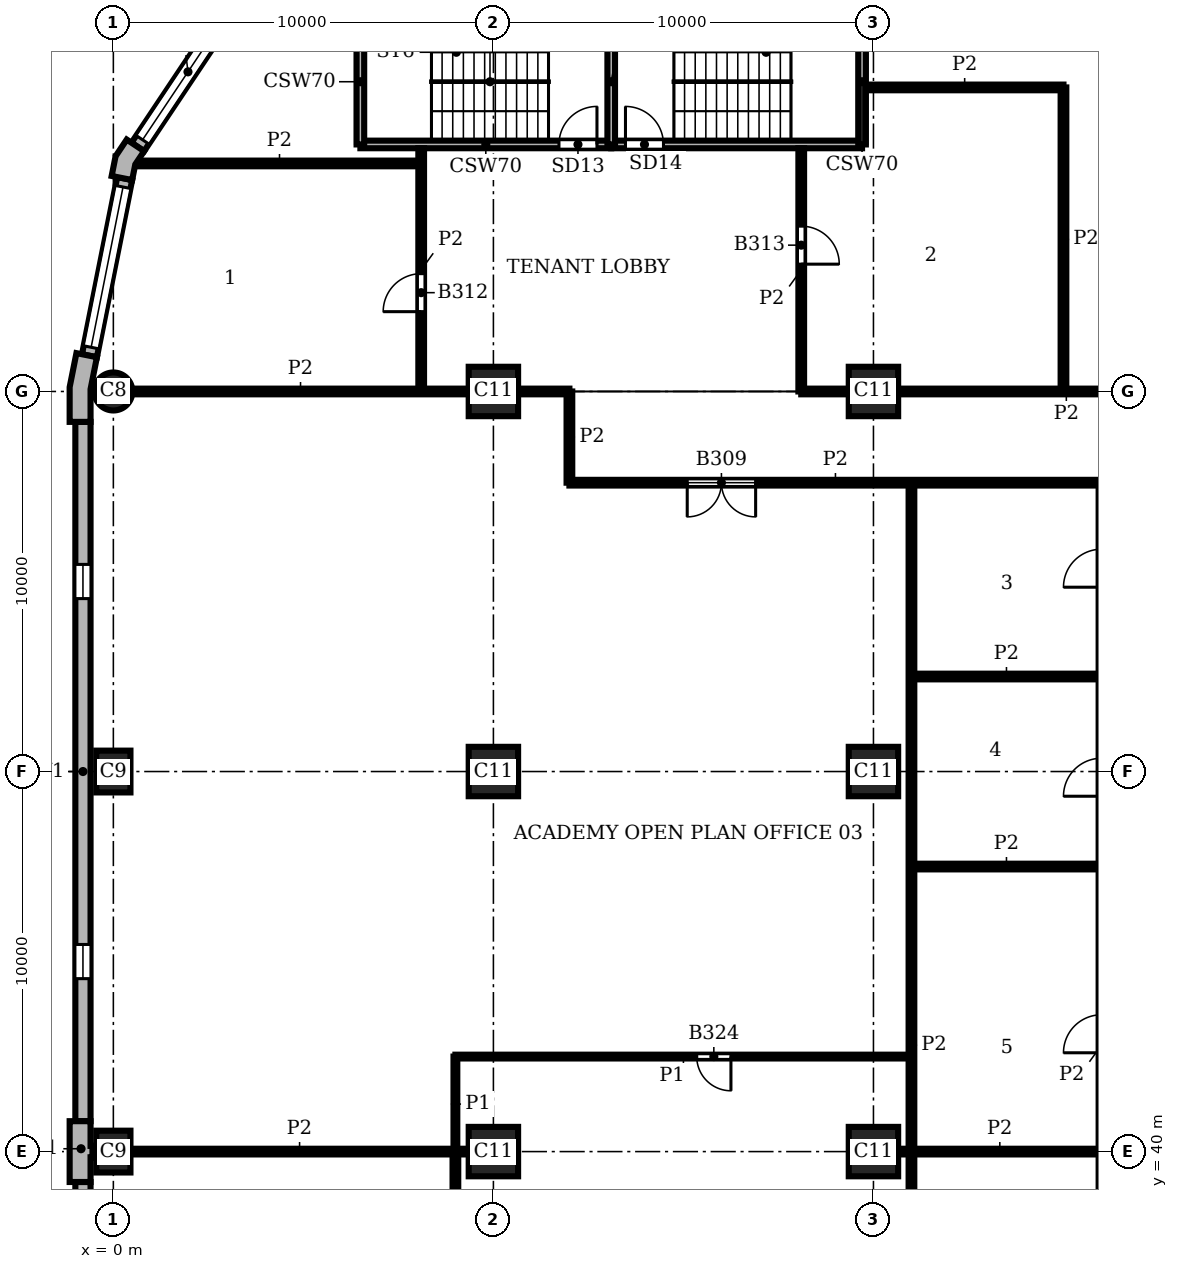
"""IFC4 building model, lengths in metres.
Left out: names, types, materials, properties, quantities, classifications, styles, units other than length and angle.
Written with IfcOpenShell. Run it as: python <this file> out.ifc"""

import sys

from ifc_helpers import new_model, si_unit, direction, frame, frame_2d, origin, origin_2d, place, context, subcontext, project, spatial, polyline, rectangle, circle, outline, extrude, element, fill, save


model = new_model("IFC4")
c1 = context("Model", 3, precision=1e-05, world=origin(), true_north=direction((0.0, 1.0)))
c2 = subcontext(c1, "Body", "Model", "MODEL_VIEW")
j1 = project(units=[si_unit("LENGTHUNIT", "METRE"), si_unit("PLANEANGLEUNIT", "RADIAN")], contexts=[c1])
p1 = place(None, origin())
s1 = spatial("IfcSite", under=j1, at=p1, CompositionType="ELEMENT")
p2 = place(p1, origin())
s2 = spatial("IfcBuilding", under=s1, at=p2, CompositionType="ELEMENT")
p3 = place(p2, frame((0.0, 0.0, 155.1)))
s3 = spatial("IfcBuildingStorey", under=s2, at=p3, CompositionType="ELEMENT", Elevation=155.1)
p4 = place(p3, frame((0.0, 60.0, 0.0), z_axis=(0.0, 0.0, 1.0), x_axis=(1.0, 0.0, 0.0)))
e1 = element("IfcColumn", 1, at=p4, inside=s3, PredefinedType="COLUMN", context=c2, shape_type="SweptSolid", body=[
    extrude(circle(Radius=0.5, at=origin_2d()), origin(), (0.0, 0.0, 1.0), 3.9),
])
for number, where, z_axis, x_axis in (
    (2, (0.0, 50.0, 0.0), (0.0, 0.0, 1.0), (0.0, 1.0, 0.0)),
    (3, (0.0, 40.0, 0.0), (0.0, 0.0, 1.0), (0.0, 1.0, 0.0)),
):
    element("IfcColumn", number, at=place(p3, frame(where, z_axis=z_axis, x_axis=x_axis)), inside=s3, PredefinedType="COLUMN", context=c2, shape_type="SweptSolid", body=[
        extrude(rectangle(XDim=1.1, YDim=0.9, at=origin_2d()), origin(), (0.0, 0.0, 1.0), 3.9),
    ])
for number, where, z_axis, x_axis in (
    (4, (10.0, 40.0, 0.0), (0.0, 0.0, 1.0), (1.0, 0.0, 0.0)),
    (5, (10.0, 50.0, 0.0), (0.0, 0.0, 1.0), (1.0, 0.0, 0.0)),
    (6, (10.0, 60.0, 0.0), (0.0, 0.0, 1.0), (1.0, 0.0, 0.0)),
    (7, (20.0, 40.0, 0.0), (0.0, 0.0, 1.0), (1.0, 0.0, 0.0)),
    (8, (20.0, 50.0, 0.0), (0.0, 0.0, 1.0), (1.0, 0.0, 0.0)),
    (9, (20.0, 60.0, 0.0), (0.0, 0.0, 1.0), (1.0, 0.0, 0.0)),
):
    element("IfcColumn", number, at=place(p3, frame(where, z_axis=z_axis, x_axis=x_axis)), inside=s3, PredefinedType="COLUMN", context=c2, shape_type="SweptSolid", body=[
        extrude(rectangle(XDim=1.3, YDim=1.3, at=origin_2d()), origin(), (0.0, 0.0, 1.0), 3.9),
    ])
p5 = place(p3, origin())
e10 = element("IfcWall", 10, at=p5, inside=s3, PredefinedType="SOLIDWALL", context=c2, shape_type="SweptSolid", body=[
    extrude(outline(polyline([(0.477, 66.545), (0.352, 66.629), (0.059, 66.189), (-0.045, 65.67), (0.103, 65.641), (0.495, 65.563), (0.577, 65.974), (0.81, 66.323), (0.477, 66.545)])), origin(), (0.0, 0.0, 1.0), 3.9),
])
e11 = element("IfcWall", 11, at=p5, inside=s3, PredefinedType="SOLIDWALL", context=c2, shape_type="SweptSolid", body=[
    extrude(outline(polyline([(-0.825, 60.98), (-0.972, 61.009), (-1.15, 60.113), (-1.15, 59.2), (-1.0, 59.2), (-0.6, 59.2), (-0.6, 60.059), (-0.432, 60.902), (-0.825, 60.98)])), origin(), (0.0, 0.0, 1.0), 3.9),
])
e12 = element("IfcWall", 12, at=p5, inside=s3, PredefinedType="SOLIDWALL", context=c2, shape_type="SweptSolid", body=[
    extrude(outline(polyline([(-0.6, 39.2), (-0.6, 39.85), (-0.55, 39.85), (-0.55, 40.15), (-0.6, 40.15), (-0.6, 40.8), (-1.0, 40.8), (-1.15, 40.8), (-1.15, 40.0), (-1.15, 39.2), (-1.0, 39.2), (-0.6, 39.2)])), origin(), (0.0, 0.0, 1.0), 3.9),
])
p6 = place(p3, frame((3.284, 70.386, 0.0), z_axis=(0.0, 0.0, 1.0), x_axis=(-0.555541552266, -0.831488775454, 0.0)))
e13 = element("IfcWall", 13, at=p6, inside=s3, PredefinedType="SOLIDWALL", context=c2, shape_type="SweptSolid", body=[
    extrude(rectangle(XDim=4.753, YDim=0.4, at=frame_2d((2.376, 0.0))), origin(), (0.0, 0.0, 1.0), 3.9),
])
p7 = place(p6, frame((0.226, 0.0, 0.9)))
e14 = element("IfcOpeningElement", 14, at=p7, cuts=e13, PredefinedType="OPENING", context=c2, shape_type="SweptSolid", body=[
    extrude(rectangle(XDim=4.3, YDim=2.35, at=frame_2d((2.15, 1.175))), frame((0.0, 0.21, 0.0), z_axis=(0.0, -1.0, 0.0), x_axis=(1.0, 0.0, 0.0)), (0.0, 0.0, 1.0), 0.42),
])
p8 = place(p3, frame((0.299, 65.602, 0.0), z_axis=(0.0, 0.0, 1.0), x_axis=(-0.195098533057, -0.98078364709, 0.0)))
e15 = element("IfcWall", 15, at=p8, inside=s3, PredefinedType="SOLIDWALL", context=c2, shape_type="SweptSolid", body=[
    extrude(rectangle(XDim=4.753, YDim=0.4, at=frame_2d((2.376, 0.0))), origin(), (0.0, 0.0, 1.0), 3.9),
])
p9 = place(p8, frame((0.226, 0.0, 0.9)))
e16 = element("IfcOpeningElement", 16, at=p9, cuts=e15, PredefinedType="OPENING", context=c2, shape_type="SweptSolid", body=[
    extrude(rectangle(XDim=4.3, YDim=2.35, at=frame_2d((2.15, 1.175))), frame((0.0, 0.21, 0.0), z_axis=(0.0, -1.0, 0.0), x_axis=(1.0, 0.0, 0.0)), (0.0, 0.0, 1.0), 0.42),
])
p10 = place(p3, frame((-0.8, 59.2, 0.0), z_axis=(0.0, 0.0, 1.0), x_axis=(0.0, -1.0, 0.0)))
e17 = element("IfcWall", 17, at=p10, inside=s3, PredefinedType="SOLIDWALL", context=c2, shape_type="SweptSolid", body=[
    extrude(rectangle(XDim=18.4, YDim=0.4, at=frame_2d((9.2, 0.0))), origin(), (0.0, 0.0, 1.0), 3.9),
])
p11 = place(p10, frame((3.75, 0.0, 0.9)))
e18 = element("IfcOpeningElement", 18, at=p11, cuts=e17, PredefinedType="OPENING", context=c2, shape_type="SweptSolid", body=[
    extrude(rectangle(XDim=0.9, YDim=2.35, at=frame_2d((0.45, 1.175))), frame((0.0, 0.21, 0.0), z_axis=(0.0, -1.0, 0.0), x_axis=(1.0, 0.0, 0.0)), (0.0, 0.0, 1.0), 0.42),
])
p12 = place(p10, frame((13.75, 0.0, 0.9)))
e19 = element("IfcOpeningElement", 19, at=p12, cuts=e17, PredefinedType="OPENING", context=c2, shape_type="SweptSolid", body=[
    extrude(rectangle(XDim=0.9, YDim=2.35, at=frame_2d((0.45, 1.175))), frame((0.0, 0.21, 0.0), z_axis=(0.0, -1.0, 0.0), x_axis=(1.0, 0.0, 0.0)), (0.0, 0.0, 1.0), 0.42),
])
p13 = place(p3, frame((-0.8, 39.2, 0.0), z_axis=(0.0, 0.0, 1.0), x_axis=(0.0, -1.0, 0.0)))
e20 = element("IfcWall", 20, at=p13, inside=s3, PredefinedType="SOLIDWALL", context=c2, shape_type="SweptSolid", body=[
    extrude(rectangle(XDim=18.4, YDim=0.4, at=frame_2d((9.2, 0.0))), origin(), (0.0, 0.0, 1.0), 3.9),
])
p14 = place(p13, frame((3.75, 0.0, 0.9)))
e21 = element("IfcOpeningElement", 21, at=p14, cuts=e20, PredefinedType="OPENING", context=c2, shape_type="SweptSolid", body=[
    extrude(rectangle(XDim=0.9, YDim=2.35, at=frame_2d((0.45, 1.175))), frame((0.0, 0.21, 0.0), z_axis=(0.0, -1.0, 0.0), x_axis=(1.0, 0.0, 0.0)), (0.0, 0.0, 1.0), 0.42),
])
p15 = place(p13, frame((13.75, 0.0, 0.9)))
e22 = element("IfcOpeningElement", 22, at=p15, cuts=e20, PredefinedType="OPENING", context=c2, shape_type="SweptSolid", body=[
    extrude(rectangle(XDim=0.9, YDim=2.35, at=frame_2d((0.45, 1.175))), frame((0.0, 0.21, 0.0), z_axis=(0.0, -1.0, 0.0), x_axis=(1.0, 0.0, 0.0)), (0.0, 0.0, 1.0), 0.42),
])
p16 = place(p3, frame((6.5, 66.5, 0.0), z_axis=(0.0, 0.0, 1.0), x_axis=(1.0, 0.0, 0.0)))
e23 = element("IfcWall", 23, at=p16, inside=s3, PredefinedType="SHEAR", context=c2, shape_type="SweptSolid", body=[
    extrude(rectangle(XDim=6.6, YDim=0.2, at=frame_2d((3.3, 0.0))), origin(), (0.0, 0.0, 1.0), 3.58),
])
p17 = place(p16, frame((5.225, 0.0, 0.0)))
e24 = element("IfcOpeningElement", 24, at=p17, cuts=e23, PredefinedType="OPENING", context=c2, shape_type="SweptSolid", body=[
    extrude(rectangle(XDim=1.0, YDim=2.1, at=frame_2d((0.5, 1.05))), frame((0.0, 0.11, 0.0), z_axis=(0.0, -1.0, 0.0), x_axis=(1.0, 0.0, 0.0)), (0.0, 0.0, 1.0), 0.22),
])
p18 = place(p3, frame((13.1, 66.5, 0.0), z_axis=(0.0, 0.0, 1.0), x_axis=(1.0, 0.0, 0.0)))
e25 = element("IfcWall", 25, at=p18, inside=s3, PredefinedType="SHEAR", context=c2, shape_type="SweptSolid", body=[
    extrude(rectangle(XDim=6.6, YDim=0.2, at=frame_2d((3.3, 0.0))), origin(), (0.0, 0.0, 1.0), 3.58),
])
p19 = place(p18, frame((0.375, 0.0, 0.0)))
e26 = element("IfcOpeningElement", 26, at=p19, cuts=e25, PredefinedType="OPENING", context=c2, shape_type="SweptSolid", body=[
    extrude(rectangle(XDim=1.0, YDim=2.1, at=frame_2d((0.5, 1.05))), frame((0.0, 0.11, 0.0), z_axis=(0.0, -1.0, 0.0), x_axis=(1.0, 0.0, 0.0)), (0.0, 0.0, 1.0), 0.22),
])
for number, where, z_axis, x_axis in (
    (27, (6.5, 66.5, 0.0), (0.0, 0.0, 1.0), (0.0, 1.0, 0.0)),
    (28, (13.1, 66.5, 0.0), (0.0, 0.0, 1.0), (0.0, 1.0, 0.0)),
    (29, (19.7, 66.5, 0.0), (0.0, 0.0, 1.0), (0.0, 1.0, 0.0)),
):
    element("IfcWall", number, at=place(p3, frame(where, z_axis=z_axis, x_axis=x_axis)), inside=s3, PredefinedType="SHEAR", context=c2, shape_type="SweptSolid", body=[
        extrude(rectangle(XDim=3.3, YDim=0.2, at=frame_2d((1.65, 0.0))), origin(), (0.0, 0.0, 1.0), 3.58),
    ])
p20 = place(p3, frame((9.0, 40.0, 0.0), z_axis=(0.0, 0.0, 1.0), x_axis=(0.0, 1.0, 0.0)))
e30 = element("IfcWall", 30, at=p20, inside=s3, PredefinedType="PARTITIONING", context=c2, shape_type="SweptSolid", body=[
    extrude(rectangle(XDim=2.5, YDim=0.1, at=frame_2d((1.25, 0.0))), origin(), (0.0, 0.0, 1.0), 3.58),
])
p21 = place(p3, frame((9.0, 42.5, 0.0), z_axis=(0.0, 0.0, 1.0), x_axis=(1.0, 0.0, 0.0)))
e31 = element("IfcWall", 31, at=p21, inside=s3, PredefinedType="PARTITIONING", context=c2, shape_type="SweptSolid", body=[
    extrude(rectangle(XDim=12.0, YDim=0.1, at=frame_2d((6.0, 0.0))), origin(), (0.0, 0.0, 1.0), 3.58),
])
p22 = place(p21, frame((6.35, 0.0, 0.0)))
e32 = element("IfcOpeningElement", 32, at=p22, cuts=e31, PredefinedType="OPENING", context=c2, shape_type="SweptSolid", body=[
    extrude(rectangle(XDim=0.9, YDim=2.1, at=frame_2d((0.45, 1.05))), frame((0.0, 0.06, 0.0), z_axis=(0.0, -1.0, 0.0), x_axis=(1.0, 0.0, 0.0)), (0.0, 0.0, 1.0), 0.12),
])
p23 = place(p3, frame((8.1, 60.0, 0.0), z_axis=(0.0, 0.0, 1.0), x_axis=(0.0, 1.0, 0.0)))
e33 = element("IfcWall", 33, at=p23, inside=s3, PredefinedType="PARTITIONING", context=c2, shape_type="SweptSolid", body=[
    extrude(rectangle(XDim=6.4, YDim=0.15, at=frame_2d((3.2, 0.0))), origin(), (0.0, 0.0, 1.0), 3.58),
])
p24 = place(p23, frame((2.1, 0.0, 0.0)))
e34 = element("IfcOpeningElement", 34, at=p24, cuts=e33, PredefinedType="OPENING", context=c2, shape_type="SweptSolid", body=[
    extrude(rectangle(XDim=1.0, YDim=2.1, at=frame_2d((0.5, 1.05))), frame((0.0, 0.085, 0.0), z_axis=(0.0, -1.0, 0.0), x_axis=(1.0, 0.0, 0.0)), (0.0, 0.0, 1.0), 0.17),
])
p25 = place(p3, frame((9.0, 28.0, 0.0), z_axis=(0.0, 0.0, 1.0), x_axis=(0.0, 1.0, 0.0)))
e35 = element("IfcWall", 35, at=p25, inside=s3, PredefinedType="PARTITIONING", context=c2, shape_type="SweptSolid", body=[
    extrude(rectangle(XDim=12.0, YDim=0.15, at=frame_2d((6.0, 0.0))), origin(), (0.0, 0.0, 1.0), 3.58),
])
p26 = place(p3, frame((12.0, 57.6, 0.0), z_axis=(0.0, 0.0, 1.0), x_axis=(0.0, 1.0, 0.0)))
e36 = element("IfcWall", 36, at=p26, inside=s3, PredefinedType="PARTITIONING", context=c2, shape_type="SweptSolid", body=[
    extrude(rectangle(XDim=2.4, YDim=0.15, at=frame_2d((1.2, 0.0))), origin(), (0.0, 0.0, 1.0), 3.58),
])
p27 = place(p3, frame((18.1, 60.0, 0.0), z_axis=(0.0, 0.0, 1.0), x_axis=(0.0, 1.0, 0.0)))
e37 = element("IfcWall", 37, at=p27, inside=s3, PredefinedType="PARTITIONING", context=c2, shape_type="SweptSolid", body=[
    extrude(rectangle(XDim=6.4, YDim=0.15, at=frame_2d((3.2, 0.0))), origin(), (0.0, 0.0, 1.0), 3.58),
])
p28 = place(p27, frame((3.35, 0.0, 0.0)))
e38 = element("IfcOpeningElement", 38, at=p28, cuts=e37, PredefinedType="OPENING", context=c2, shape_type="SweptSolid", body=[
    extrude(rectangle(XDim=1.0, YDim=2.1, at=frame_2d((0.5, 1.05))), frame((0.0, 0.085, 0.0), z_axis=(0.0, -1.0, 0.0), x_axis=(1.0, 0.0, 0.0)), (0.0, 0.0, 1.0), 0.17),
])
p29 = place(p3, frame((21.0, 28.0, 0.0), z_axis=(0.0, 0.0, 1.0), x_axis=(0.0, 1.0, 0.0)))
e39 = element("IfcWall", 39, at=p29, inside=s3, PredefinedType="PARTITIONING", context=c2, shape_type="SweptSolid", body=[
    extrude(rectangle(XDim=29.6, YDim=0.15, at=frame_2d((14.8, 0.0))), origin(), (0.0, 0.0, 1.0), 3.58),
])
p30 = place(p3, frame((25.0, 60.0, 0.0), z_axis=(0.0, 0.0, 1.0), x_axis=(0.0, 1.0, 0.0)))
e40 = element("IfcWall", 40, at=p30, inside=s3, PredefinedType="PARTITIONING", context=c2, shape_type="SweptSolid", body=[
    extrude(rectangle(XDim=8.0, YDim=0.15, at=frame_2d((4.0, 0.0))), origin(), (0.0, 0.0, 1.0), 3.58),
])
p31 = place(p3, frame((0.45, 40.0, 0.0), z_axis=(0.0, 0.0, 1.0), x_axis=(1.0, 0.0, 0.0)))
e41 = element("IfcWall", 41, at=p31, inside=s3, PredefinedType="PARTITIONING", context=c2, shape_type="SweptSolid", body=[
    extrude(rectangle(XDim=8.9, YDim=0.15, at=frame_2d((4.45, 0.0))), origin(), (0.0, 0.0, 1.0), 3.58),
])
p32 = place(p3, frame((20.65, 40.0, 0.0), z_axis=(0.0, 0.0, 1.0), x_axis=(1.0, 0.0, 0.0)))
e42 = element("IfcWall", 42, at=p32, inside=s3, PredefinedType="PARTITIONING", context=c2, shape_type="SweptSolid", body=[
    extrude(rectangle(XDim=5.35, YDim=0.15, at=frame_2d((2.675, 0.0))), origin(), (0.0, 0.0, 1.0), 3.58),
])
for number, where, z_axis, x_axis in (
    (43, (21.0, 47.5, 0.0), (0.0, 0.0, 1.0), (1.0, 0.0, 0.0)),
    (44, (21.0, 52.5, 0.0), (0.0, 0.0, 1.0), (1.0, 0.0, 0.0)),
):
    element("IfcWall", number, at=place(p3, frame(where, z_axis=z_axis, x_axis=x_axis)), inside=s3, PredefinedType="PARTITIONING", context=c2, shape_type="SweptSolid", body=[
        extrude(rectangle(XDim=5.0, YDim=0.15, at=frame_2d((2.5, 0.0))), origin(), (0.0, 0.0, 1.0), 3.58),
    ])
p33 = place(p3, frame((12.0, 57.6, 0.0), z_axis=(0.0, 0.0, 1.0), x_axis=(1.0, 0.0, 0.0)))
e45 = element("IfcWall", 45, at=p33, inside=s3, PredefinedType="PARTITIONING", context=c2, shape_type="SweptSolid", body=[
    extrude(rectangle(XDim=14.0, YDim=0.15, at=frame_2d((7.0, 0.0))), origin(), (0.0, 0.0, 1.0), 3.58),
])
p34 = place(p33, frame((3.1, 0.0, 0.0)))
e46 = element("IfcOpeningElement", 46, at=p34, cuts=e45, PredefinedType="OPENING", context=c2, shape_type="SweptSolid", body=[
    extrude(rectangle(XDim=1.8, YDim=2.1, at=frame_2d((0.9, 1.05))), frame((0.0, 0.085, 0.0), z_axis=(0.0, -1.0, 0.0), x_axis=(1.0, 0.0, 0.0)), (0.0, 0.0, 1.0), 0.17),
])
p35 = place(p3, frame((0.5, 60.0, 0.0), z_axis=(0.0, 0.0, 1.0), x_axis=(1.0, 0.0, 0.0)))
e47 = element("IfcWall", 47, at=p35, inside=s3, PredefinedType="PARTITIONING", context=c2, shape_type="SweptSolid", body=[
    extrude(rectangle(XDim=8.85, YDim=0.15, at=frame_2d((4.425, 0.0))), origin(), (0.0, 0.0, 1.0), 3.58),
])
p36 = place(p3, frame((10.65, 60.0, 0.0), z_axis=(0.0, 0.0, 1.0), x_axis=(1.0, 0.0, 0.0)))
e48 = element("IfcWall", 48, at=p36, inside=s3, PredefinedType="PARTITIONING", context=c2, shape_type="SweptSolid", body=[
    extrude(rectangle(XDim=1.35, YDim=0.15, at=frame_2d((0.675, 0.0))), origin(), (0.0, 0.0, 1.0), 3.58),
])
p37 = place(p3, frame((18.1, 60.0, 0.0), z_axis=(0.0, 0.0, 1.0), x_axis=(1.0, 0.0, 0.0)))
e49 = element("IfcWall", 49, at=p37, inside=s3, PredefinedType="PARTITIONING", context=c2, shape_type="SweptSolid", body=[
    extrude(rectangle(XDim=1.25, YDim=0.15, at=frame_2d((0.625, 0.0))), origin(), (0.0, 0.0, 1.0), 3.58),
])
p38 = place(p3, frame((20.65, 60.0, 0.0), z_axis=(0.0, 0.0, 1.0), x_axis=(1.0, 0.0, 0.0)))
e50 = element("IfcWall", 50, at=p38, inside=s3, PredefinedType="PARTITIONING", context=c2, shape_type="SweptSolid", body=[
    extrude(rectangle(XDim=8.85, YDim=0.15, at=frame_2d((4.425, 0.0))), origin(), (0.0, 0.0, 1.0), 3.58),
])
p39 = place(p38, frame((5.7, 0.0, 0.0)))
e51 = element("IfcOpeningElement", 51, at=p39, cuts=e50, PredefinedType="OPENING", context=c2, shape_type="SweptSolid", body=[
    extrude(rectangle(XDim=1.8, YDim=2.1, at=frame_2d((0.9, 1.05))), frame((0.0, 0.085, 0.0), z_axis=(0.0, -1.0, 0.0), x_axis=(1.0, 0.0, 0.0)), (0.0, 0.0, 1.0), 0.17),
])
p40 = place(p3, frame((0.644, 66.0, 0.0), z_axis=(0.0, 0.0, 1.0), x_axis=(1.0, 0.0, 0.0)))
e52 = element("IfcWall", 52, at=p40, inside=s3, PredefinedType="PARTITIONING", context=c2, shape_type="SweptSolid", body=[
    extrude(rectangle(XDim=7.456, YDim=0.15, at=frame_2d((3.728, 0.0))), origin(), (0.0, 0.0, 1.0), 3.58),
])
p41 = place(p3, frame((19.8, 68.0, 0.0), z_axis=(0.0, 0.0, 1.0), x_axis=(1.0, 0.0, 0.0)))
e53 = element("IfcWall", 53, at=p41, inside=s3, PredefinedType="PARTITIONING", context=c2, shape_type="SweptSolid", body=[
    extrude(rectangle(XDim=5.2, YDim=0.15, at=frame_2d((2.6, 0.0))), origin(), (0.0, 0.0, 1.0), 3.58),
])
p42 = place(p7, origin())
e54 = element("IfcWindow", 54, at=p42, inside=s3, PartitioningType="SINGLE_PANEL", PredefinedType="WINDOW", context=c2, shape_type="SweptSolid", body=[
    extrude(rectangle(XDim=4.3, YDim=2.35, at=frame_2d((2.15, 1.175))), frame((0.0, 0.16, 0.0), z_axis=(0.0, -1.0, 0.0), x_axis=(1.0, 0.0, 0.0)), (0.0, 0.0, 1.0), 0.06),
])
fill(e14, e54)
p43 = place(p9, origin())
e55 = element("IfcWindow", 55, at=p43, inside=s3, PartitioningType="SINGLE_PANEL", PredefinedType="WINDOW", context=c2, shape_type="SweptSolid", body=[
    extrude(rectangle(XDim=4.3, YDim=2.35, at=frame_2d((2.15, 1.175))), frame((0.0, 0.16, 0.0), z_axis=(0.0, -1.0, 0.0), x_axis=(1.0, 0.0, 0.0)), (0.0, 0.0, 1.0), 0.06),
])
fill(e16, e55)
p44 = place(p11, origin())
e56 = element("IfcWindow", 56, at=p44, inside=s3, PartitioningType="SINGLE_PANEL", PredefinedType="WINDOW", context=c2, shape_type="SweptSolid", body=[
    extrude(rectangle(XDim=0.9, YDim=2.35, at=frame_2d((0.45, 1.175))), frame((0.0, 0.16, 0.0), z_axis=(0.0, -1.0, 0.0), x_axis=(1.0, 0.0, 0.0)), (0.0, 0.0, 1.0), 0.06),
])
fill(e18, e56)
p45 = place(p12, origin())
e57 = element("IfcWindow", 57, at=p45, inside=s3, PartitioningType="SINGLE_PANEL", PredefinedType="WINDOW", context=c2, shape_type="SweptSolid", body=[
    extrude(rectangle(XDim=0.9, YDim=2.35, at=frame_2d((0.45, 1.175))), frame((0.0, 0.16, 0.0), z_axis=(0.0, -1.0, 0.0), x_axis=(1.0, 0.0, 0.0)), (0.0, 0.0, 1.0), 0.06),
])
fill(e19, e57)
p46 = place(p17, origin())
e58 = element("IfcDoor", 58, at=p46, inside=s3, OperationType="SINGLE_SWING_RIGHT", PredefinedType="DOOR", context=c2, shape_type="SweptSolid", body=[
    extrude(rectangle(XDim=1.0, YDim=2.1, at=frame_2d((0.5, 1.05))), frame((0.0, 0.025, 0.0), z_axis=(0.0, -1.0, 0.0), x_axis=(1.0, 0.0, 0.0)), (0.0, 0.0, 1.0), 0.05),
])
fill(e24, e58)
p47 = place(p19, origin())
e59 = element("IfcDoor", 59, at=p47, inside=s3, OperationType="SINGLE_SWING_LEFT", PredefinedType="DOOR", context=c2, shape_type="SweptSolid", body=[
    extrude(rectangle(XDim=1.0, YDim=2.1, at=frame_2d((0.5, 1.05))), frame((0.0, 0.025, 0.0), z_axis=(0.0, -1.0, 0.0), x_axis=(1.0, 0.0, 0.0)), (0.0, 0.0, 1.0), 0.05),
])
fill(e26, e59)
p48 = place(p34, frame((1.8, 0.0, 0.0), z_axis=(0.0, 0.0, 1.0), x_axis=(-1.0, 0.0, 0.0)))
e60 = element("IfcDoor", 60, at=p48, inside=s3, OperationType="DOUBLE_DOOR_SINGLE_SWING", PredefinedType="DOOR", context=c2, shape_type="SweptSolid", body=[
    extrude(rectangle(XDim=1.8, YDim=2.1, at=frame_2d((0.9, 1.05))), frame((0.0, 0.025, 0.0), z_axis=(0.0, -1.0, 0.0), x_axis=(1.0, 0.0, 0.0)), (0.0, 0.0, 1.0), 0.05),
])
fill(e46, e60)
p49 = place(p24, origin())
e61 = element("IfcDoor", 61, at=p49, inside=s3, OperationType="SINGLE_SWING_LEFT", PredefinedType="DOOR", context=c2, shape_type="SweptSolid", body=[
    extrude(rectangle(XDim=1.0, YDim=2.1, at=frame_2d((0.5, 1.05))), frame((0.0, 0.025, 0.0), z_axis=(0.0, -1.0, 0.0), x_axis=(1.0, 0.0, 0.0)), (0.0, 0.0, 1.0), 0.05),
])
fill(e34, e61)
p50 = place(p28, frame((1.0, 0.0, 0.0), z_axis=(0.0, 0.0, 1.0), x_axis=(-1.0, 0.0, 0.0)))
e62 = element("IfcDoor", 62, at=p50, inside=s3, OperationType="SINGLE_SWING_RIGHT", PredefinedType="DOOR", context=c2, shape_type="SweptSolid", body=[
    extrude(rectangle(XDim=1.0, YDim=2.1, at=frame_2d((0.5, 1.05))), frame((0.0, 0.025, 0.0), z_axis=(0.0, -1.0, 0.0), x_axis=(1.0, 0.0, 0.0)), (0.0, 0.0, 1.0), 0.05),
])
fill(e38, e62)
p51 = place(p22, frame((0.9, 0.0, 0.0), z_axis=(0.0, 0.0, 1.0), x_axis=(-1.0, 0.0, 0.0)))
e63 = element("IfcDoor", 63, at=p51, inside=s3, OperationType="SINGLE_SWING_LEFT", PredefinedType="DOOR", context=c2, shape_type="SweptSolid", body=[
    extrude(rectangle(XDim=0.9, YDim=2.1, at=frame_2d((0.45, 1.05))), frame((0.0, 0.025, 0.0), z_axis=(0.0, -1.0, 0.0), x_axis=(1.0, 0.0, 0.0)), (0.0, 0.0, 1.0), 0.05),
])
fill(e32, e63)
save(model, sys.argv[1])
